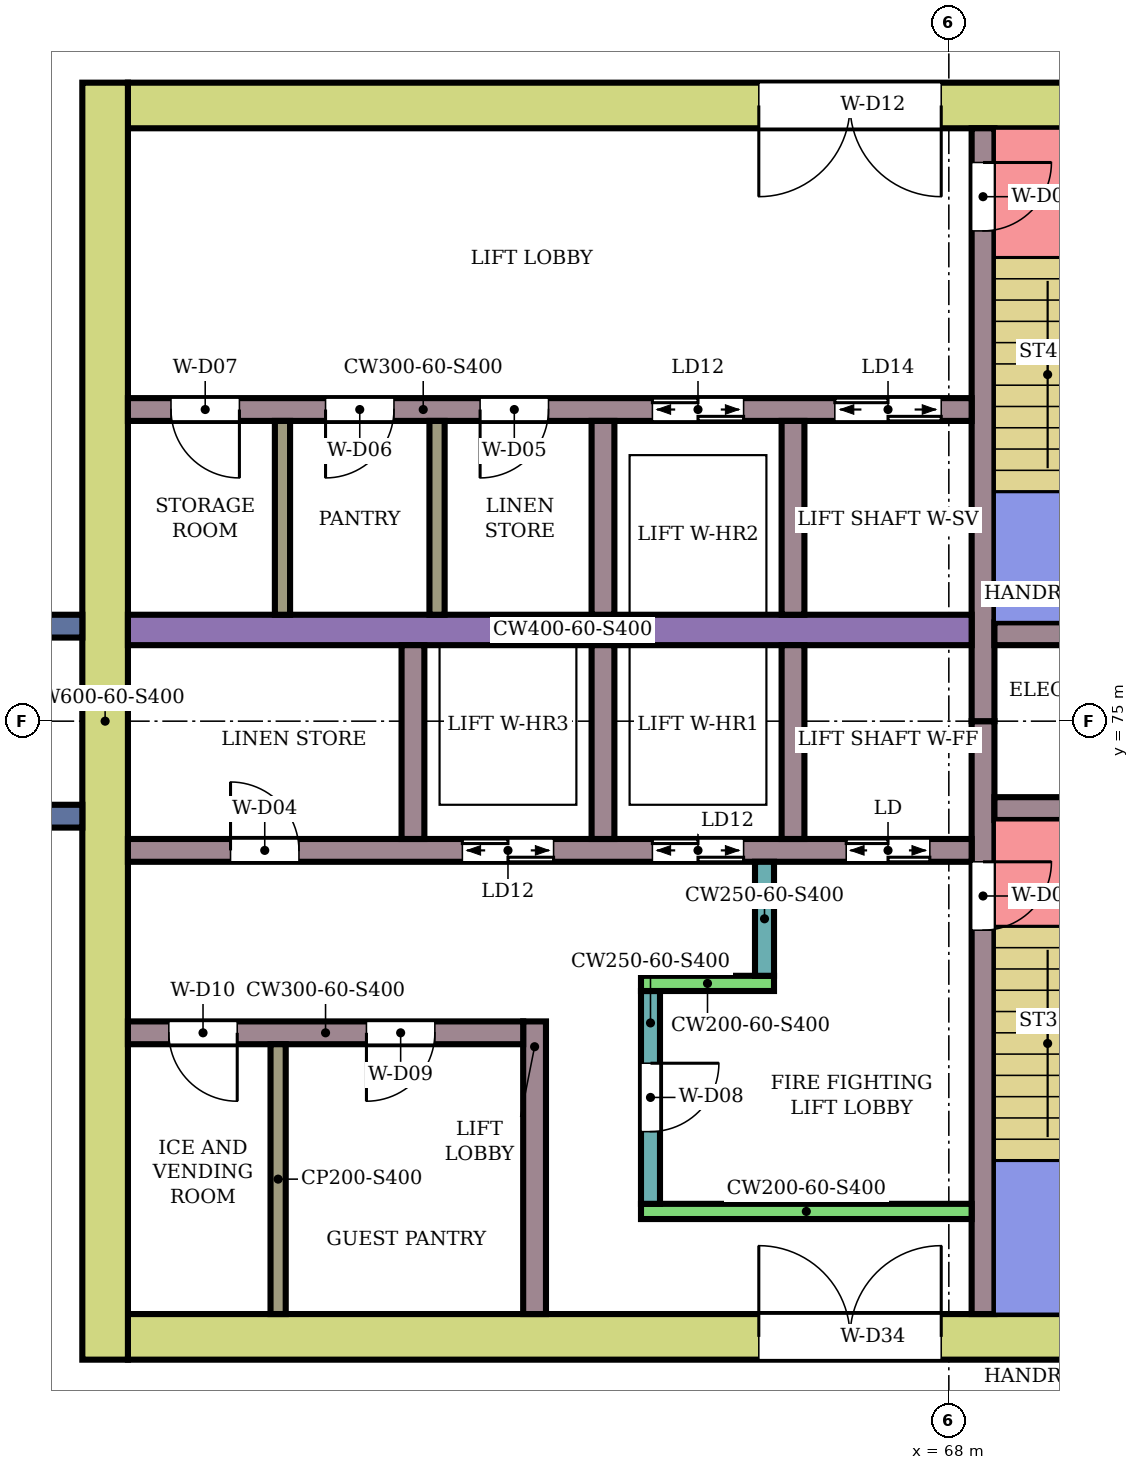
"""IFC4 building model, lengths in metres.
Left out: names, types, materials, properties, quantities, classifications, styles, units other than length and angle.
Written with IfcOpenShell. Run it as: python <this file> out.ifc"""

import sys

from ifc_helpers import new_model, si_unit, direction, frame, frame_2d, origin, place, context, subcontext, project, spatial, rectangle, extrude, element, fill, save


model = new_model("IFC4")
c1 = context("Model", 3, precision=1e-05, world=origin(), true_north=direction((0.0, 1.0)))
c2 = subcontext(c1, "Body", "Model", "MODEL_VIEW")
j1 = project(units=[si_unit("LENGTHUNIT", "METRE"), si_unit("PLANEANGLEUNIT", "RADIAN")], contexts=[c1])
p1 = place(None, origin())
s1 = spatial("IfcSite", under=j1, at=p1, CompositionType="ELEMENT")
p2 = place(p1, origin())
s2 = spatial("IfcBuilding", under=s1, at=p2, CompositionType="ELEMENT")
p3 = place(p2, frame((0.0, 0.0, 225.1)))
s3 = spatial("IfcBuildingStorey", under=s2, at=p3, CompositionType="ELEMENT", Elevation=225.1)
p4 = place(p3, frame((72.1, 66.9, 0.0), z_axis=(0.0, 0.0, 1.0), x_axis=(-1.0, 0.0, 0.0)))
e1 = element("IfcWall", 1, at=p4, inside=s3, PredefinedType="SHEAR", context=c2, shape_type="SweptSolid", body=[
    extrude(rectangle(XDim=14.9, YDim=0.6, at=frame_2d((7.45, 0.0))), origin(), (0.0, 0.0, 1.0), 3.8),
])
p5 = place(p4, frame((4.2, 0.0, 0.0)))
e2 = element("IfcOpeningElement", 2, at=p5, cuts=e1, PredefinedType="OPENING", context=c2, shape_type="SweptSolid", body=[
    extrude(rectangle(XDim=2.4, YDim=2.4, at=frame_2d((1.2, 1.2))), frame((0.0, 0.31, 0.0), z_axis=(0.0, -1.0, 0.0), x_axis=(1.0, 0.0, 0.0)), (0.0, 0.0, 1.0), 0.62),
])
p6 = place(p3, frame((72.1, 83.1, 0.0), z_axis=(0.0, 0.0, 1.0), x_axis=(-1.0, 0.0, 0.0)))
e3 = element("IfcWall", 3, at=p6, inside=s3, PredefinedType="SHEAR", context=c2, shape_type="SweptSolid", body=[
    extrude(rectangle(XDim=14.9, YDim=0.6, at=frame_2d((7.45, 0.0))), origin(), (0.0, 0.0, 1.0), 3.8),
])
p7 = place(p6, frame((4.2, 0.0, 0.0)))
e4 = element("IfcOpeningElement", 4, at=p7, cuts=e3, PredefinedType="OPENING", context=c2, shape_type="SweptSolid", body=[
    extrude(rectangle(XDim=2.4, YDim=2.4, at=frame_2d((1.2, 1.2))), frame((0.0, 0.31, 0.0), z_axis=(0.0, -1.0, 0.0), x_axis=(1.0, 0.0, 0.0)), (0.0, 0.0, 1.0), 0.62),
])
p8 = place(p3, frame((56.9, 83.4, 0.0), z_axis=(0.0, 0.0, 1.0), x_axis=(0.0, -1.0, 0.0)))
e5 = element("IfcWall", 5, at=p8, inside=s3, PredefinedType="SHEAR", context=c2, shape_type="SweptSolid", body=[
    extrude(rectangle(XDim=16.8, YDim=0.6, at=frame_2d((8.4, 0.0))), origin(), (0.0, 0.0, 1.0), 3.8),
])
p9 = place(p3, frame((68.45, 75.0, 0.0), z_axis=(0.0, 0.0, 1.0), x_axis=(0.0, -1.0, 0.0)))
e6 = element("IfcWall", 6, at=p9, inside=s3, PredefinedType="SHEAR", context=c2, shape_type="SweptSolid", body=[
    extrude(rectangle(XDim=7.8, YDim=0.3, at=frame_2d((3.9, 0.0))), origin(), (0.0, 0.0, 1.0), 3.8),
])
p10 = place(p9, frame((1.85, 0.0, 0.0)))
e7 = element("IfcOpeningElement", 7, at=p10, cuts=e6, PredefinedType="OPENING", context=c2, shape_type="SweptSolid", body=[
    extrude(rectangle(XDim=0.9, YDim=2.1, at=frame_2d((0.45, 1.05))), frame((0.0, 0.16, 0.0), z_axis=(0.0, -1.0, 0.0), x_axis=(1.0, 0.0, 0.0)), (0.0, 0.0, 1.0), 0.32),
])
p11 = place(p3, frame((68.45, 82.8, 0.0), z_axis=(0.0, 0.0, 1.0), x_axis=(0.0, -1.0, 0.0)))
e8 = element("IfcWall", 8, at=p11, inside=s3, PredefinedType="SHEAR", context=c2, shape_type="SweptSolid", body=[
    extrude(rectangle(XDim=7.8, YDim=0.3, at=frame_2d((3.9, 0.0))), origin(), (0.0, 0.0, 1.0), 3.8),
])
p12 = place(p11, frame((0.45, 0.0, 0.0)))
e9 = element("IfcOpeningElement", 9, at=p12, cuts=e8, PredefinedType="OPENING", context=c2, shape_type="SweptSolid", body=[
    extrude(rectangle(XDim=0.9, YDim=2.1, at=frame_2d((0.45, 1.05))), frame((0.0, 0.16, 0.0), z_axis=(0.0, -1.0, 0.0), x_axis=(1.0, 0.0, 0.0)), (0.0, 0.0, 1.0), 0.32),
])
p13 = place(p3, frame((71.65, 73.85, 0.0), z_axis=(0.0, 0.0, 1.0), x_axis=(-1.0, 0.0, 0.0)))
e10 = element("IfcWall", 10, at=p13, inside=s3, PredefinedType="SHEAR", context=c2, shape_type="SweptSolid", body=[
    extrude(rectangle(XDim=3.05, YDim=0.3, at=frame_2d((1.525, 0.0))), origin(), (0.0, 0.0, 1.0), 3.8),
])
p14 = place(p13, frame((1.1, 0.0, 0.0)))
e11 = element("IfcOpeningElement", 11, at=p14, cuts=e10, PredefinedType="OPENING", context=c2, shape_type="SweptSolid", body=[
    extrude(rectangle(XDim=0.7, YDim=2.0, at=frame_2d((0.35, 1.0))), frame((0.0, 0.16, 0.0), z_axis=(0.0, -1.0, 0.0), x_axis=(1.0, 0.0, 0.0)), (0.0, 0.0, 1.0), 0.32),
])
p15 = place(p3, frame((71.65, 76.15, 0.0), z_axis=(0.0, 0.0, 1.0), x_axis=(-1.0, 0.0, 0.0)))
e12 = element("IfcWall", 12, at=p15, inside=s3, PredefinedType="SHEAR", context=c2, shape_type="SweptSolid", body=[
    extrude(rectangle(XDim=3.05, YDim=0.3, at=frame_2d((1.525, 0.0))), origin(), (0.0, 0.0, 1.0), 3.8),
])
p16 = place(p3, frame((68.3, 73.3, 0.0), z_axis=(0.0, 0.0, 1.0), x_axis=(-1.0, 0.0, 0.0)))
e13 = element("IfcWall", 13, at=p16, inside=s3, PredefinedType="SHEAR", context=c2, shape_type="SweptSolid", body=[
    extrude(rectangle(XDim=11.1, YDim=0.3, at=frame_2d((5.55, 0.0))), origin(), (0.0, 0.0, 1.0), 3.8),
])
p17 = place(p16, frame((0.55, 0.0, 0.0)))
e14 = element("IfcOpeningElement", 14, at=p17, cuts=e13, PredefinedType="OPENING", context=c2, shape_type="SweptSolid", body=[
    extrude(rectangle(XDim=1.1, YDim=2.1, at=frame_2d((0.55, 1.05))), frame((0.0, 0.16, 0.0), z_axis=(0.0, -1.0, 0.0), x_axis=(1.0, 0.0, 0.0)), (0.0, 0.0, 1.0), 0.32),
])
p18 = place(p16, frame((3.0, 0.0, 0.0)))
e15 = element("IfcOpeningElement", 15, at=p18, cuts=e13, PredefinedType="OPENING", context=c2, shape_type="SweptSolid", body=[
    extrude(rectangle(XDim=1.2, YDim=2.1, at=frame_2d((0.6, 1.05))), frame((0.0, 0.16, 0.0), z_axis=(0.0, -1.0, 0.0), x_axis=(1.0, 0.0, 0.0)), (0.0, 0.0, 1.0), 0.32),
])
p19 = place(p16, frame((5.5, 0.0, 0.0)))
e16 = element("IfcOpeningElement", 16, at=p19, cuts=e13, PredefinedType="OPENING", context=c2, shape_type="SweptSolid", body=[
    extrude(rectangle(XDim=1.2, YDim=2.1, at=frame_2d((0.6, 1.05))), frame((0.0, 0.16, 0.0), z_axis=(0.0, -1.0, 0.0), x_axis=(1.0, 0.0, 0.0)), (0.0, 0.0, 1.0), 0.32),
])
p20 = place(p16, frame((8.85, 0.0, 0.0)))
e17 = element("IfcOpeningElement", 17, at=p20, cuts=e13, PredefinedType="OPENING", context=c2, shape_type="SweptSolid", body=[
    extrude(rectangle(XDim=0.9, YDim=2.1, at=frame_2d((0.45, 1.05))), frame((0.0, 0.16, 0.0), z_axis=(0.0, -1.0, 0.0), x_axis=(1.0, 0.0, 0.0)), (0.0, 0.0, 1.0), 0.32),
])
p21 = place(p3, frame((68.3, 76.2, 0.0), z_axis=(0.0, 0.0, 1.0), x_axis=(-1.0, 0.0, 0.0)))
e18 = element("IfcWall", 18, at=p21, inside=s3, PredefinedType="SHEAR", context=c2, shape_type="SweptSolid", body=[
    extrude(rectangle(XDim=11.1, YDim=0.4, at=frame_2d((5.55, 0.0))), origin(), (0.0, 0.0, 1.0), 3.8),
])
p22 = place(p3, frame((68.3, 79.1, 0.0), z_axis=(0.0, 0.0, 1.0), x_axis=(-1.0, 0.0, 0.0)))
e19 = element("IfcWall", 19, at=p22, inside=s3, PredefinedType="SHEAR", context=c2, shape_type="SweptSolid", body=[
    extrude(rectangle(XDim=11.1, YDim=0.3, at=frame_2d((5.55, 0.0))), origin(), (0.0, 0.0, 1.0), 3.8),
])
p23 = place(p22, frame((0.4, 0.0, 0.0)))
e20 = element("IfcOpeningElement", 20, at=p23, cuts=e19, PredefinedType="OPENING", context=c2, shape_type="SweptSolid", body=[
    extrude(rectangle(XDim=1.4, YDim=2.1, at=frame_2d((0.7, 1.05))), frame((0.0, 0.16, 0.0), z_axis=(0.0, -1.0, 0.0), x_axis=(1.0, 0.0, 0.0)), (0.0, 0.0, 1.0), 0.32),
])
p24 = place(p22, frame((3.0, 0.0, 0.0)))
e21 = element("IfcOpeningElement", 21, at=p24, cuts=e19, PredefinedType="OPENING", context=c2, shape_type="SweptSolid", body=[
    extrude(rectangle(XDim=1.2, YDim=2.1, at=frame_2d((0.6, 1.05))), frame((0.0, 0.16, 0.0), z_axis=(0.0, -1.0, 0.0), x_axis=(1.0, 0.0, 0.0)), (0.0, 0.0, 1.0), 0.32),
])
p25 = place(p22, frame((5.567, 0.0, 0.0)))
e22 = element("IfcOpeningElement", 22, at=p25, cuts=e19, PredefinedType="OPENING", context=c2, shape_type="SweptSolid", body=[
    extrude(rectangle(XDim=0.9, YDim=2.1, at=frame_2d((0.45, 1.05))), frame((0.0, 0.16, 0.0), z_axis=(0.0, -1.0, 0.0), x_axis=(1.0, 0.0, 0.0)), (0.0, 0.0, 1.0), 0.32),
])
p26 = place(p22, frame((7.6, 0.0, 0.0)))
e23 = element("IfcOpeningElement", 23, at=p26, cuts=e19, PredefinedType="OPENING", context=c2, shape_type="SweptSolid", body=[
    extrude(rectangle(XDim=0.9, YDim=2.1, at=frame_2d((0.45, 1.05))), frame((0.0, 0.16, 0.0), z_axis=(0.0, -1.0, 0.0), x_axis=(1.0, 0.0, 0.0)), (0.0, 0.0, 1.0), 0.32),
])
p27 = place(p22, frame((9.633, 0.0, 0.0)))
e24 = element("IfcOpeningElement", 24, at=p27, cuts=e19, PredefinedType="OPENING", context=c2, shape_type="SweptSolid", body=[
    extrude(rectangle(XDim=0.9, YDim=2.1, at=frame_2d((0.45, 1.05))), frame((0.0, 0.16, 0.0), z_axis=(0.0, -1.0, 0.0), x_axis=(1.0, 0.0, 0.0)), (0.0, 0.0, 1.0), 0.32),
])
for number, where, z_axis, x_axis in (
    (25, (65.95, 76.0, 0.0), (0.0, 0.0, 1.0), (0.0, -1.0, 0.0)),
    (26, (63.45, 76.0, 0.0), (0.0, 0.0, 1.0), (0.0, -1.0, 0.0)),
    (27, (60.95, 76.0, 0.0), (0.0, 0.0, 1.0), (0.0, -1.0, 0.0)),
    (28, (65.95, 78.95, 0.0), (0.0, 0.0, 1.0), (0.0, -1.0, 0.0)),
    (29, (63.45, 78.95, 0.0), (0.0, 0.0, 1.0), (0.0, -1.0, 0.0)),
):
    element("IfcWall", number, at=place(p3, frame(where, z_axis=z_axis, x_axis=x_axis)), inside=s3, PredefinedType="SHEAR", context=c2, shape_type="SweptSolid", body=[
        extrude(rectangle(XDim=2.55, YDim=0.3, at=frame_2d((1.275, 0.0))), origin(), (0.0, 0.0, 1.0), 3.8),
    ])
p28 = place(p3, frame((68.3, 68.55, 0.0), z_axis=(0.0, 0.0, 1.0), x_axis=(-1.0, 0.0, 0.0)))
e30 = element("IfcWall", 30, at=p28, inside=s3, PredefinedType="SHEAR", context=c2, shape_type="SweptSolid", body=[
    extrude(rectangle(XDim=4.35, YDim=0.2, at=frame_2d((2.175, 0.0))), origin(), (0.0, 0.0, 1.0), 3.8),
])
p29 = place(p3, frame((64.075, 71.45, 0.0), z_axis=(0.0, 0.0, 1.0), x_axis=(0.0, -1.0, 0.0)))
e31 = element("IfcWall", 31, at=p29, inside=s3, PredefinedType="SHEAR", context=c2, shape_type="SweptSolid", body=[
    extrude(rectangle(XDim=2.8, YDim=0.25, at=frame_2d((1.4, 0.0))), origin(), (0.0, 0.0, 1.0), 3.8),
])
p30 = place(p29, frame((0.95, 0.0, 0.0)))
e32 = element("IfcOpeningElement", 32, at=p30, cuts=e31, PredefinedType="OPENING", context=c2, shape_type="SweptSolid", body=[
    extrude(rectangle(XDim=0.9, YDim=2.1, at=frame_2d((0.45, 1.05))), frame((0.0, 0.135, 0.0), z_axis=(0.0, -1.0, 0.0), x_axis=(1.0, 0.0, 0.0)), (0.0, 0.0, 1.0), 0.27),
])
p31 = place(p3, frame((65.7, 71.55, 0.0), z_axis=(0.0, 0.0, 1.0), x_axis=(-1.0, 0.0, 0.0)))
e33 = element("IfcWall", 33, at=p31, inside=s3, PredefinedType="SHEAR", context=c2, shape_type="SweptSolid", body=[
    extrude(rectangle(XDim=1.75, YDim=0.2, at=frame_2d((0.875, 0.0))), origin(), (0.0, 0.0, 1.0), 3.8),
])
p32 = place(p3, frame((65.575, 73.15, 0.0), z_axis=(0.0, 0.0, 1.0), x_axis=(0.0, -1.0, 0.0)))
e34 = element("IfcWall", 34, at=p32, inside=s3, PredefinedType="SHEAR", context=c2, shape_type="SweptSolid", body=[
    extrude(rectangle(XDim=1.5, YDim=0.25, at=frame_2d((0.75, 0.0))), origin(), (0.0, 0.0, 1.0), 3.8),
])
p33 = place(p3, frame((62.55, 71.05, 0.0), z_axis=(0.0, 0.0, 1.0), x_axis=(0.0, -1.0, 0.0)))
e35 = element("IfcWall", 35, at=p33, inside=s3, PredefinedType="SHEAR", context=c2, shape_type="SweptSolid", body=[
    extrude(rectangle(XDim=3.85, YDim=0.3, at=frame_2d((1.925, 0.0))), origin(), (0.0, 0.0, 1.0), 3.8),
])
p34 = place(p3, frame((62.4, 70.9, 0.0), z_axis=(0.0, 0.0, 1.0), x_axis=(-1.0, 0.0, 0.0)))
e36 = element("IfcWall", 36, at=p34, inside=s3, PredefinedType="SHEAR", context=c2, shape_type="SweptSolid", body=[
    extrude(rectangle(XDim=5.2, YDim=0.3, at=frame_2d((2.6, 0.0))), origin(), (0.0, 0.0, 1.0), 3.8),
])
p35 = place(p34, frame((1.162, 0.0, 0.0)))
e37 = element("IfcOpeningElement", 37, at=p35, cuts=e36, PredefinedType="OPENING", context=c2, shape_type="SweptSolid", body=[
    extrude(rectangle(XDim=0.9, YDim=2.1, at=frame_2d((0.45, 1.05))), frame((0.0, 0.16, 0.0), z_axis=(0.0, -1.0, 0.0), x_axis=(1.0, 0.0, 0.0)), (0.0, 0.0, 1.0), 0.32),
])
p36 = place(p34, frame((3.762, 0.0, 0.0)))
e38 = element("IfcOpeningElement", 38, at=p36, cuts=e36, PredefinedType="OPENING", context=c2, shape_type="SweptSolid", body=[
    extrude(rectangle(XDim=0.9, YDim=2.1, at=frame_2d((0.45, 1.05))), frame((0.0, 0.16, 0.0), z_axis=(0.0, -1.0, 0.0), x_axis=(1.0, 0.0, 0.0)), (0.0, 0.0, 1.0), 0.32),
])
for number, where, z_axis, x_axis in (
    (39, (56.6, 76.25, 0.0), (0.0, 0.0, 1.0), (-1.0, 0.0, 0.0)),
    (40, (56.6, 73.75, 0.0), (0.0, 0.0, 1.0), (-1.0, 0.0, 0.0)),
):
    element("IfcWall", number, at=place(p3, frame(where, z_axis=z_axis, x_axis=x_axis)), inside=s3, PredefinedType="NOTDEFINED", context=c2, shape_type="SweptSolid", body=[
        extrude(rectangle(XDim=2.416, YDim=0.3, at=frame_2d((1.208, 0.0))), origin(), (0.0, 0.0, 1.0), 4.2),
    ])
for number, where, z_axis, x_axis in (
    (41, (61.267, 78.95, 0.0), (0.0, 0.0, 1.0), (0.0, -1.0, 0.0)),
    (42, (59.233, 78.95, 0.0), (0.0, 0.0, 1.0), (0.0, -1.0, 0.0)),
):
    element("IfcWall", number, at=place(p3, frame(where, z_axis=z_axis, x_axis=x_axis)), inside=s3, PredefinedType="PARTITIONING", context=c2, shape_type="SweptSolid", body=[
        extrude(rectangle(XDim=2.55, YDim=0.2, at=frame_2d((1.275, 0.0))), origin(), (0.0, 0.0, 1.0), 3.8),
    ])
p37 = place(p3, frame((59.176, 70.75, 0.0), z_axis=(0.0, 0.0, 1.0), x_axis=(0.0, -1.0, 0.0)))
e43 = element("IfcWall", 43, at=p37, inside=s3, PredefinedType="PARTITIONING", context=c2, shape_type="SweptSolid", body=[
    extrude(rectangle(XDim=3.55, YDim=0.2, at=frame_2d((1.775, 0.0))), origin(), (0.0, 0.0, 1.0), 3.8),
])
p38 = place(p10, origin())
e44 = element("IfcDoor", 44, at=p38, inside=s3, OperationType="SINGLE_SWING_LEFT", PredefinedType="DOOR", context=c2, shape_type="SweptSolid", body=[
    extrude(rectangle(XDim=0.9, YDim=2.1, at=frame_2d((0.45, 1.05))), frame((0.0, 0.025, 0.0), z_axis=(0.0, -1.0, 0.0), x_axis=(1.0, 0.0, 0.0)), (0.0, 0.0, 1.0), 0.05),
])
fill(e7, e44)
p39 = place(p12, origin())
e45 = element("IfcDoor", 45, at=p39, inside=s3, OperationType="SINGLE_SWING_LEFT", PredefinedType="DOOR", context=c2, shape_type="SweptSolid", body=[
    extrude(rectangle(XDim=0.9, YDim=2.1, at=frame_2d((0.45, 1.05))), frame((0.0, 0.025, 0.0), z_axis=(0.0, -1.0, 0.0), x_axis=(1.0, 0.0, 0.0)), (0.0, 0.0, 1.0), 0.05),
])
fill(e9, e45)
p40 = place(p17, origin())
e46 = element("IfcDoor", 46, at=p40, inside=s3, OperationType="DOUBLE_DOOR_SLIDING", PredefinedType="DOOR", context=c2, shape_type="SweptSolid", body=[
    extrude(rectangle(XDim=1.1, YDim=2.1, at=frame_2d((0.55, 1.05))), frame((0.0, 0.025, 0.0), z_axis=(0.0, -1.0, 0.0), x_axis=(1.0, 0.0, 0.0)), (0.0, 0.0, 1.0), 0.05),
])
fill(e14, e46)
p41 = place(p18, origin())
e47 = element("IfcDoor", 47, at=p41, inside=s3, OperationType="DOUBLE_DOOR_SLIDING", PredefinedType="DOOR", context=c2, shape_type="SweptSolid", body=[
    extrude(rectangle(XDim=1.2, YDim=2.1, at=frame_2d((0.6, 1.05))), frame((0.0, 0.025, 0.0), z_axis=(0.0, -1.0, 0.0), x_axis=(1.0, 0.0, 0.0)), (0.0, 0.0, 1.0), 0.05),
])
fill(e15, e47)
p42 = place(p19, origin())
e48 = element("IfcDoor", 48, at=p42, inside=s3, OperationType="DOUBLE_DOOR_SLIDING", PredefinedType="DOOR", context=c2, shape_type="SweptSolid", body=[
    extrude(rectangle(XDim=1.2, YDim=2.1, at=frame_2d((0.6, 1.05))), frame((0.0, 0.025, 0.0), z_axis=(0.0, -1.0, 0.0), x_axis=(1.0, 0.0, 0.0)), (0.0, 0.0, 1.0), 0.05),
])
fill(e16, e48)
p43 = place(p20, frame((0.9, 0.0, 0.0), z_axis=(0.0, 0.0, 1.0), x_axis=(-1.0, 0.0, 0.0)))
e49 = element("IfcDoor", 49, at=p43, inside=s3, OperationType="SINGLE_SWING_LEFT", PredefinedType="DOOR", context=c2, shape_type="SweptSolid", body=[
    extrude(rectangle(XDim=0.9, YDim=2.1, at=frame_2d((0.45, 1.05))), frame((0.0, 0.025, 0.0), z_axis=(0.0, -1.0, 0.0), x_axis=(1.0, 0.0, 0.0)), (0.0, 0.0, 1.0), 0.05),
])
fill(e17, e49)
p44 = place(p23, origin())
e50 = element("IfcDoor", 50, at=p44, inside=s3, OperationType="DOUBLE_DOOR_SLIDING", PredefinedType="DOOR", context=c2, shape_type="SweptSolid", body=[
    extrude(rectangle(XDim=1.4, YDim=2.1, at=frame_2d((0.7, 1.05))), frame((0.0, 0.025, 0.0), z_axis=(0.0, -1.0, 0.0), x_axis=(1.0, 0.0, 0.0)), (0.0, 0.0, 1.0), 0.05),
])
fill(e20, e50)
p45 = place(p24, origin())
e51 = element("IfcDoor", 51, at=p45, inside=s3, OperationType="DOUBLE_DOOR_SLIDING", PredefinedType="DOOR", context=c2, shape_type="SweptSolid", body=[
    extrude(rectangle(XDim=1.2, YDim=2.1, at=frame_2d((0.6, 1.05))), frame((0.0, 0.025, 0.0), z_axis=(0.0, -1.0, 0.0), x_axis=(1.0, 0.0, 0.0)), (0.0, 0.0, 1.0), 0.05),
])
fill(e21, e51)
p46 = place(p25, origin())
e52 = element("IfcDoor", 52, at=p46, inside=s3, OperationType="SINGLE_SWING_RIGHT", PredefinedType="DOOR", context=c2, shape_type="SweptSolid", body=[
    extrude(rectangle(XDim=0.9, YDim=2.1, at=frame_2d((0.45, 1.05))), frame((0.0, 0.025, 0.0), z_axis=(0.0, -1.0, 0.0), x_axis=(1.0, 0.0, 0.0)), (0.0, 0.0, 1.0), 0.05),
])
fill(e22, e52)
p47 = place(p26, origin())
e53 = element("IfcDoor", 53, at=p47, inside=s3, OperationType="SINGLE_SWING_RIGHT", PredefinedType="DOOR", context=c2, shape_type="SweptSolid", body=[
    extrude(rectangle(XDim=0.9, YDim=2.1, at=frame_2d((0.45, 1.05))), frame((0.0, 0.025, 0.0), z_axis=(0.0, -1.0, 0.0), x_axis=(1.0, 0.0, 0.0)), (0.0, 0.0, 1.0), 0.05),
])
fill(e23, e53)
p48 = place(p27, origin())
e54 = element("IfcDoor", 54, at=p48, inside=s3, OperationType="SINGLE_SWING_LEFT", PredefinedType="DOOR", context=c2, shape_type="SweptSolid", body=[
    extrude(rectangle(XDim=0.9, YDim=2.1, at=frame_2d((0.45, 1.05))), frame((0.0, 0.025, 0.0), z_axis=(0.0, -1.0, 0.0), x_axis=(1.0, 0.0, 0.0)), (0.0, 0.0, 1.0), 0.05),
])
fill(e24, e54)
p49 = place(p30, origin())
e55 = element("IfcDoor", 55, at=p49, inside=s3, OperationType="SINGLE_SWING_LEFT", PredefinedType="DOOR", context=c2, shape_type="SweptSolid", body=[
    extrude(rectangle(XDim=0.9, YDim=2.1, at=frame_2d((0.45, 1.05))), frame((0.0, 0.025, 0.0), z_axis=(0.0, -1.0, 0.0), x_axis=(1.0, 0.0, 0.0)), (0.0, 0.0, 1.0), 0.05),
])
fill(e32, e55)
p50 = place(p35, origin())
e56 = element("IfcDoor", 56, at=p50, inside=s3, OperationType="SINGLE_SWING_RIGHT", PredefinedType="DOOR", context=c2, shape_type="SweptSolid", body=[
    extrude(rectangle(XDim=0.9, YDim=2.1, at=frame_2d((0.45, 1.05))), frame((0.0, 0.025, 0.0), z_axis=(0.0, -1.0, 0.0), x_axis=(1.0, 0.0, 0.0)), (0.0, 0.0, 1.0), 0.05),
])
fill(e37, e56)
p51 = place(p36, origin())
e57 = element("IfcDoor", 57, at=p51, inside=s3, OperationType="SINGLE_SWING_LEFT", PredefinedType="DOOR", context=c2, shape_type="SweptSolid", body=[
    extrude(rectangle(XDim=0.9, YDim=2.1, at=frame_2d((0.45, 1.05))), frame((0.0, 0.025, 0.0), z_axis=(0.0, -1.0, 0.0), x_axis=(1.0, 0.0, 0.0)), (0.0, 0.0, 1.0), 0.05),
])
fill(e38, e57)
p52 = place(p5, frame((2.4, 0.0, 0.0), z_axis=(0.0, 0.0, 1.0), x_axis=(-1.0, 0.0, 0.0)))
e58 = element("IfcDoor", 58, at=p52, inside=s3, OperationType="DOUBLE_DOOR_SINGLE_SWING", PredefinedType="DOOR", context=c2, shape_type="SweptSolid", body=[
    extrude(rectangle(XDim=2.4, YDim=2.4, at=frame_2d((1.2, 1.2))), frame((0.0, 0.025, 0.0), z_axis=(0.0, -1.0, 0.0), x_axis=(1.0, 0.0, 0.0)), (0.0, 0.0, 1.0), 0.05),
])
fill(e2, e58)
p53 = place(p7, origin())
e59 = element("IfcDoor", 59, at=p53, inside=s3, OperationType="DOUBLE_DOOR_SINGLE_SWING", PredefinedType="DOOR", context=c2, shape_type="SweptSolid", body=[
    extrude(rectangle(XDim=2.4, YDim=2.4, at=frame_2d((1.2, 1.2))), frame((0.0, 0.025, 0.0), z_axis=(0.0, -1.0, 0.0), x_axis=(1.0, 0.0, 0.0)), (0.0, 0.0, 1.0), 0.05),
])
fill(e4, e59)
save(model, sys.argv[1])
